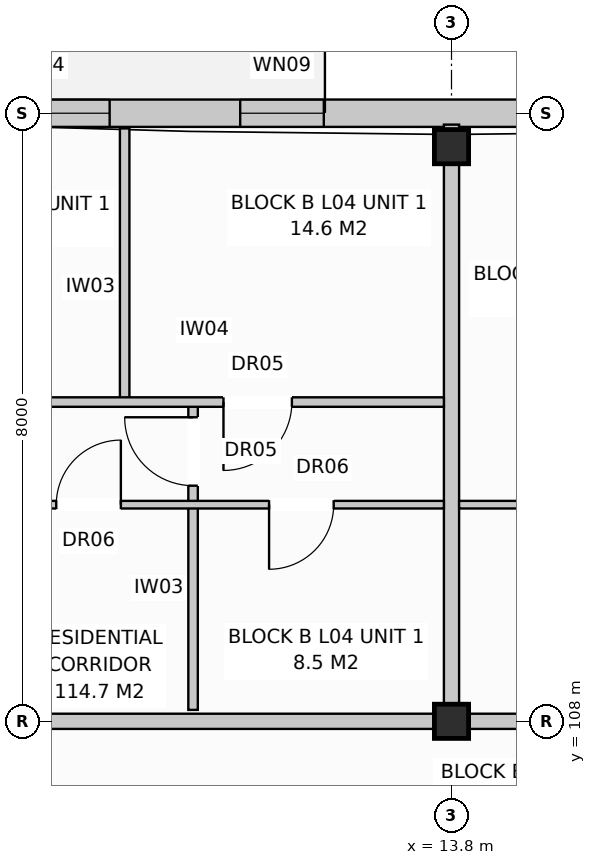
"""IFC4 building model, lengths in metres.
Left out: names, types, materials, properties, quantities, classifications, styles, units other than length and angle.
Written with IfcOpenShell. Run it as: python <this file> out.ifc"""

import sys

from ifc_helpers import new_model, si_unit, direction, frame, frame_2d, origin, origin_with_axes, origin_2d, place, context, subcontext, project, spatial, rectangle, extrude, element, fill, save


model = new_model("IFC4")
c1 = context("Model", 3, precision=1e-05, world=origin(), true_north=direction((0.0, 1.0)))
c2 = subcontext(c1, "Body", "Model", "MODEL_VIEW")
j1 = project(units=[si_unit("LENGTHUNIT", "METRE"), si_unit("PLANEANGLEUNIT", "RADIAN")], contexts=[c1])
p1 = place(None, origin())
s1 = spatial("IfcSite", under=j1, at=p1, CompositionType="ELEMENT")
p2 = place(p1, origin())
s2 = spatial("IfcBuilding", under=s1, at=p2, CompositionType="ELEMENT")
p3 = place(p2, frame((0.0, 0.0, 14.4)))
s3 = spatial("IfcBuildingStorey", under=s2, at=p3, CompositionType="ELEMENT", Elevation=14.4)
for number, where, z_axis, x_axis in (
    (1, (13.8, 108.0, 0.0), (0.0, 0.0, 1.0), (1.0, 0.0, 0.0)),
    (2, (13.8, 115.56, 0.0), (0.0, 0.0, 1.0), (1.0, 0.0, 0.0)),
):
    element("IfcColumn", number, at=place(p3, frame(where, z_axis=z_axis, x_axis=x_axis)), inside=s3, PredefinedType="COLUMN", context=c2, shape_type="SweptSolid", body=[
        extrude(rectangle(XDim=0.45, YDim=0.45, at=origin_2d()), origin(), (0.0, 0.0, 1.0), 3.2),
    ])
p4 = place(p3, frame((0.17, 116.0, 0.0), z_axis=(0.0, 0.0, 1.0), x_axis=(1.0, 0.0, 0.0)))
e3 = element("IfcWall", 3, at=p4, inside=s3, PredefinedType="STANDARD", context=c2, shape_type="SweptSolid", body=[
    extrude(rectangle(XDim=54.86, YDim=0.36, at=frame_2d((27.43, 0.0))), origin(), (0.0, 0.0, 1.0), 2.94),
])
p5 = place(p4, frame((3.815, 0.0, 0.0)))
e4 = element("IfcOpeningElement", 4, at=p5, cuts=e3, PredefinedType="OPENING", context=c2, shape_type="SweptSolid", body=[
    extrude(rectangle(XDim=0.95, YDim=2.1, at=frame_2d((0.475, 1.05))), frame((0.0, 0.192, 0.0), z_axis=(0.0, -1.0, 0.0), x_axis=(1.0, 0.0, 0.0)), (0.0, 0.0, 1.0), 0.384),
])
p6 = place(p4, frame((16.615, 0.0, 0.0)))
e5 = element("IfcOpeningElement", 5, at=p6, cuts=e3, PredefinedType="OPENING", context=c2, shape_type="SweptSolid", body=[
    extrude(rectangle(XDim=0.95, YDim=2.1, at=frame_2d((0.475, 1.05))), frame((0.0, 0.192, 0.0), z_axis=(0.0, -1.0, 0.0), x_axis=(1.0, 0.0, 0.0)), (0.0, 0.0, 1.0), 0.384),
])
p7 = place(p4, frame((30.115, 0.0, 0.0)))
e6 = element("IfcOpeningElement", 6, at=p7, cuts=e3, PredefinedType="OPENING", context=c2, shape_type="SweptSolid", body=[
    extrude(rectangle(XDim=0.95, YDim=2.1, at=frame_2d((0.475, 1.05))), frame((0.0, 0.192, 0.0), z_axis=(0.0, -1.0, 0.0), x_axis=(1.0, 0.0, 0.0)), (0.0, 0.0, 1.0), 0.384),
])
p8 = place(p4, frame((45.228, 0.0, 0.0)))
e7 = element("IfcOpeningElement", 7, at=p8, cuts=e3, PredefinedType="OPENING", context=c2, shape_type="SweptSolid", body=[
    extrude(rectangle(XDim=0.95, YDim=2.1, at=frame_2d((0.475, 1.05))), frame((0.0, 0.192, 0.0), z_axis=(0.0, -1.0, 0.0), x_axis=(1.0, 0.0, 0.0)), (0.0, 0.0, 1.0), 0.384),
])
p9 = place(p4, frame((1.55, 0.0, 0.8)))
e8 = element("IfcOpeningElement", 8, at=p9, cuts=e3, PredefinedType="OPENING", context=c2, shape_type="SweptSolid", body=[
    extrude(rectangle(XDim=1.9, YDim=1.85, at=frame_2d((0.95, 0.925))), frame((0.0, 0.192, 0.0), z_axis=(0.0, -1.0, 0.0), x_axis=(1.0, 0.0, 0.0)), (0.0, 0.0, 1.0), 0.384),
])
p10 = place(p4, frame((7.183, 0.0, 0.8)))
e9 = element("IfcOpeningElement", 9, at=p10, cuts=e3, PredefinedType="OPENING", context=c2, shape_type="SweptSolid", body=[
    extrude(rectangle(XDim=1.95, YDim=1.65, at=frame_2d((0.975, 0.825))), frame((0.0, 0.192, 0.0), z_axis=(0.0, -1.0, 0.0), x_axis=(1.0, 0.0, 0.0)), (0.0, 0.0, 1.0), 0.384),
])
p11 = place(p4, frame((10.85, 0.0, 0.72)))
e10 = element("IfcOpeningElement", 10, at=p11, cuts=e3, PredefinedType="OPENING", context=c2, shape_type="SweptSolid", body=[
    extrude(rectangle(XDim=1.1, YDim=1.5, at=frame_2d((0.55, 0.75))), frame((0.0, 0.192, 0.0), z_axis=(0.0, -1.0, 0.0), x_axis=(1.0, 0.0, 0.0)), (0.0, 0.0, 1.0), 0.384),
])
p12 = place(p4, frame((14.85, 0.0, 0.72)))
e11 = element("IfcOpeningElement", 11, at=p12, cuts=e3, PredefinedType="OPENING", context=c2, shape_type="SweptSolid", body=[
    extrude(rectangle(XDim=1.1, YDim=1.5, at=frame_2d((0.55, 0.75))), frame((0.0, 0.192, 0.0), z_axis=(0.0, -1.0, 0.0), x_axis=(1.0, 0.0, 0.0)), (0.0, 0.0, 1.0), 0.384),
])
p13 = place(p4, frame((18.125, 0.0, 0.8)))
e12 = element("IfcOpeningElement", 12, at=p13, cuts=e3, PredefinedType="OPENING", context=c2, shape_type="SweptSolid", body=[
    extrude(rectangle(XDim=1.95, YDim=1.65, at=frame_2d((0.975, 0.825))), frame((0.0, 0.192, 0.0), z_axis=(0.0, -1.0, 0.0), x_axis=(1.0, 0.0, 0.0)), (0.0, 0.0, 1.0), 0.384),
])
p14 = place(p4, frame((23.9, 0.0, 0.8)))
e13 = element("IfcOpeningElement", 13, at=p14, cuts=e3, PredefinedType="OPENING", context=c2, shape_type="SweptSolid", body=[
    extrude(rectangle(XDim=1.8, YDim=1.7, at=frame_2d((0.9, 0.85))), frame((0.0, 0.192, 0.0), z_axis=(0.0, -1.0, 0.0), x_axis=(1.0, 0.0, 0.0)), (0.0, 0.0, 1.0), 0.384),
])
p15 = place(p4, frame((28.35, 0.0, 0.72)))
e14 = element("IfcOpeningElement", 14, at=p15, cuts=e3, PredefinedType="OPENING", context=c2, shape_type="SweptSolid", body=[
    extrude(rectangle(XDim=1.1, YDim=1.5, at=frame_2d((0.55, 0.75))), frame((0.0, 0.192, 0.0), z_axis=(0.0, -1.0, 0.0), x_axis=(1.0, 0.0, 0.0)), (0.0, 0.0, 1.0), 0.384),
])
p16 = place(p4, frame((31.825, 0.0, 0.8)))
e15 = element("IfcOpeningElement", 15, at=p16, cuts=e3, PredefinedType="OPENING", context=c2, shape_type="SweptSolid", body=[
    extrude(rectangle(XDim=1.95, YDim=1.65, at=frame_2d((0.975, 0.825))), frame((0.0, 0.192, 0.0), z_axis=(0.0, -1.0, 0.0), x_axis=(1.0, 0.0, 0.0)), (0.0, 0.0, 1.0), 0.384),
])
p17 = place(p4, frame((35.4, 0.0, 0.8)))
e16 = element("IfcOpeningElement", 16, at=p17, cuts=e3, PredefinedType="OPENING", context=c2, shape_type="SweptSolid", body=[
    extrude(rectangle(XDim=1.8, YDim=1.7, at=frame_2d((0.9, 0.85))), frame((0.0, 0.192, 0.0), z_axis=(0.0, -1.0, 0.0), x_axis=(1.0, 0.0, 0.0)), (0.0, 0.0, 1.0), 0.384),
])
p18 = place(p4, frame((39.15, 0.0, 0.72)))
e17 = element("IfcOpeningElement", 17, at=p18, cuts=e3, PredefinedType="OPENING", context=c2, shape_type="SweptSolid", body=[
    extrude(rectangle(XDim=1.1, YDim=1.5, at=frame_2d((0.55, 0.75))), frame((0.0, 0.192, 0.0), z_axis=(0.0, -1.0, 0.0), x_axis=(1.0, 0.0, 0.0)), (0.0, 0.0, 1.0), 0.384),
])
p19 = place(p4, frame((43.35, 0.0, 0.72)))
e18 = element("IfcOpeningElement", 18, at=p19, cuts=e3, PredefinedType="OPENING", context=c2, shape_type="SweptSolid", body=[
    extrude(rectangle(XDim=1.1, YDim=1.5, at=frame_2d((0.55, 0.75))), frame((0.0, 0.192, 0.0), z_axis=(0.0, -1.0, 0.0), x_axis=(1.0, 0.0, 0.0)), (0.0, 0.0, 1.0), 0.384),
])
p20 = place(p4, frame((48.7, 0.0, 0.8)))
e19 = element("IfcOpeningElement", 19, at=p20, cuts=e3, PredefinedType="OPENING", context=c2, shape_type="SweptSolid", body=[
    extrude(rectangle(XDim=1.8, YDim=1.7, at=frame_2d((0.9, 0.85))), frame((0.0, 0.192, 0.0), z_axis=(0.0, -1.0, 0.0), x_axis=(1.0, 0.0, 0.0)), (0.0, 0.0, 1.0), 0.384),
])
p21 = place(p4, frame((52.25, 0.0, 0.72)))
e20 = element("IfcOpeningElement", 20, at=p21, cuts=e3, PredefinedType="OPENING", context=c2, shape_type="SweptSolid", body=[
    extrude(rectangle(XDim=1.1, YDim=1.5, at=frame_2d((0.55, 0.75))), frame((0.0, 0.192, 0.0), z_axis=(0.0, -1.0, 0.0), x_axis=(1.0, 0.0, 0.0)), (0.0, 0.0, 1.0), 0.384),
])
p22 = place(p3, frame((13.8, 108.15, 0.0), z_axis=(0.0, 0.0, 1.0), x_axis=(0.0, 1.0, 0.0)))
e21 = element("IfcWall", 21, at=p22, inside=s3, PredefinedType="PARTITIONING", context=c2, shape_type="SweptSolid", body=[
    extrude(rectangle(XDim=7.7, YDim=0.2, at=frame_2d((3.85, 0.0))), origin(), (0.0, 0.0, 1.0), 2.94),
])
p23 = place(p3, frame((0.0, 108.0, 0.0), z_axis=(0.0, 0.0, 1.0), x_axis=(1.0, 0.0, 0.0)))
e22 = element("IfcWall", 22, at=p23, inside=s3, PredefinedType="PARTITIONING", context=c2, shape_type="SweptSolid", body=[
    extrude(rectangle(XDim=13.8, YDim=0.2, at=frame_2d((6.9, 0.0))), origin(), (0.0, 0.0, 1.0), 2.38),
])
p24 = place(p23, frame((2.4, 0.0, 0.0)))
e23 = element("IfcOpeningElement", 23, at=p24, cuts=e22, PredefinedType="OPENING", context=c2, shape_type="SweptSolid", body=[
    extrude(rectangle(XDim=0.95, YDim=2.15, at=frame_2d((0.475, 1.075))), frame((0.0, 0.112, 0.0), z_axis=(0.0, -1.0, 0.0), x_axis=(1.0, 0.0, 0.0)), (0.0, 0.0, 1.0), 0.224),
])
p25 = place(p3, frame((10.4, 108.15, 0.0), z_axis=(0.0, 0.0, 1.0), x_axis=(0.0, 1.0, 0.0)))
e24 = element("IfcWall", 24, at=p25, inside=s3, PredefinedType="PARTITIONING", context=c2, shape_type="SweptSolid", body=[
    extrude(rectangle(XDim=4.05, YDim=0.125, at=frame_2d((2.025, 0.0))), origin(), (0.0, 0.0, 1.0), 2.94),
])
p26 = place(p25, frame((2.95, 0.0, 0.0)))
e25 = element("IfcOpeningElement", 25, at=p26, cuts=e24, PredefinedType="OPENING", context=c2, shape_type="SweptSolid", body=[
    extrude(rectangle(XDim=0.9, YDim=2.1, at=frame_2d((0.45, 1.05))), frame((0.0, 0.074, 0.0), z_axis=(0.0, -1.0, 0.0), x_axis=(1.0, 0.0, 0.0)), (0.0, 0.0, 1.0), 0.149),
])
p27 = place(p3, frame((9.5, 112.2, 0.0), z_axis=(0.0, 0.0, 1.0), x_axis=(0.0, 1.0, 0.0)))
e26 = element("IfcWall", 26, at=p27, inside=s3, PredefinedType="PARTITIONING", context=c2, shape_type="SweptSolid", body=[
    extrude(rectangle(XDim=3.6, YDim=0.125, at=frame_2d((1.8, 0.0))), origin(), (0.0, 0.0, 1.0), 2.94),
])
p28 = place(p3, frame((5.2, 110.85, 0.0), z_axis=(0.0, 0.0, 1.0), x_axis=(1.0, 0.0, 0.0)))
e27 = element("IfcWall", 27, at=p28, inside=s3, PredefinedType="PARTITIONING", context=c2, shape_type="SweptSolid", body=[
    extrude(rectangle(XDim=8.5, YDim=0.1, at=frame_2d((4.25, 0.0))), origin(), (0.0, 0.0, 1.0), 2.94),
])
p29 = place(p28, frame((1.0, 0.0, 0.0)))
e28 = element("IfcOpeningElement", 28, at=p29, cuts=e27, PredefinedType="OPENING", context=c2, shape_type="SweptSolid", body=[
    extrude(rectangle(XDim=0.85, YDim=2.1, at=frame_2d((0.425, 1.05))), frame((0.0, 0.062, 0.0), z_axis=(0.0, -1.0, 0.0), x_axis=(1.0, 0.0, 0.0)), (0.0, 0.0, 1.0), 0.124),
])
p30 = place(p28, frame((3.4, 0.0, 0.0)))
e29 = element("IfcOpeningElement", 29, at=p30, cuts=e27, PredefinedType="OPENING", context=c2, shape_type="SweptSolid", body=[
    extrude(rectangle(XDim=0.85, YDim=2.05, at=frame_2d((0.425, 1.025))), frame((0.0, 0.062, 0.0), z_axis=(0.0, -1.0, 0.0), x_axis=(1.0, 0.0, 0.0)), (0.0, 0.0, 1.0), 0.124),
])
p31 = place(p28, frame((6.2, 0.0, 0.0)))
e30 = element("IfcOpeningElement", 30, at=p31, cuts=e27, PredefinedType="OPENING", context=c2, shape_type="SweptSolid", body=[
    extrude(rectangle(XDim=0.85, YDim=2.05, at=frame_2d((0.425, 1.025))), frame((0.0, 0.062, 0.0), z_axis=(0.0, -1.0, 0.0), x_axis=(1.0, 0.0, 0.0)), (0.0, 0.0, 1.0), 0.124),
])
p32 = place(p3, frame((5.2, 112.2, 0.0), z_axis=(0.0, 0.0, 1.0), x_axis=(1.0, 0.0, 0.0)))
e31 = element("IfcWall", 31, at=p32, inside=s3, PredefinedType="PARTITIONING", context=c2, shape_type="SweptSolid", body=[
    extrude(rectangle(XDim=8.5, YDim=0.125, at=frame_2d((4.25, 0.0))), origin(), (0.0, 0.0, 1.0), 2.94),
])
p33 = place(p32, frame((1.5, 0.0, 0.0)))
e32 = element("IfcOpeningElement", 32, at=p33, cuts=e31, PredefinedType="OPENING", context=c2, shape_type="SweptSolid", body=[
    extrude(rectangle(XDim=0.9, YDim=2.1, at=frame_2d((0.45, 1.05))), frame((0.0, 0.074, 0.0), z_axis=(0.0, -1.0, 0.0), x_axis=(1.0, 0.0, 0.0)), (0.0, 0.0, 1.0), 0.149),
])
p34 = place(p32, frame((5.6, 0.0, 0.0)))
e33 = element("IfcOpeningElement", 33, at=p34, cuts=e31, PredefinedType="OPENING", context=c2, shape_type="SweptSolid", body=[
    extrude(rectangle(XDim=0.9, YDim=2.1, at=frame_2d((0.45, 1.05))), frame((0.0, 0.074, 0.0), z_axis=(0.0, -1.0, 0.0), x_axis=(1.0, 0.0, 0.0)), (0.0, 0.0, 1.0), 0.149),
])
p35 = place(p3, frame((13.8, 108.0, 0.0), z_axis=(0.0, 0.0, 1.0), x_axis=(1.0, 0.0, 0.0)))
e34 = element("IfcWall", 34, at=p35, inside=s3, PredefinedType="PARTITIONING", context=c2, shape_type="SweptSolid", body=[
    extrude(rectangle(XDim=13.8, YDim=0.2, at=frame_2d((6.9, 0.0))), origin(), (0.0, 0.0, 1.0), 2.38),
])
p36 = place(p35, frame((9.6, 0.0, 0.0)))
e35 = element("IfcOpeningElement", 35, at=p36, cuts=e34, PredefinedType="OPENING", context=c2, shape_type="SweptSolid", body=[
    extrude(rectangle(XDim=0.95, YDim=2.15, at=frame_2d((0.475, 1.075))), frame((0.0, 0.112, 0.0), z_axis=(0.0, -1.0, 0.0), x_axis=(1.0, 0.0, 0.0)), (0.0, 0.0, 1.0), 0.224),
])
p37 = place(p3, frame((13.9, 110.85, 0.0), z_axis=(0.0, 0.0, 1.0), x_axis=(1.0, 0.0, 0.0)))
e36 = element("IfcWall", 36, at=p37, inside=s3, PredefinedType="PARTITIONING", context=c2, shape_type="SweptSolid", body=[
    extrude(rectangle(XDim=8.6, YDim=0.1, at=frame_2d((4.3, 0.0))), origin(), (0.0, 0.0, 1.0), 2.94),
])
p38 = place(p37, frame((1.4, 0.0, 0.0)))
e37 = element("IfcOpeningElement", 37, at=p38, cuts=e36, PredefinedType="OPENING", context=c2, shape_type="SweptSolid", body=[
    extrude(rectangle(XDim=0.85, YDim=2.05, at=frame_2d((0.425, 1.025))), frame((0.0, 0.062, 0.0), z_axis=(0.0, -1.0, 0.0), x_axis=(1.0, 0.0, 0.0)), (0.0, 0.0, 1.0), 0.124),
])
p39 = place(p37, frame((4.65, 0.0, 0.0)))
e38 = element("IfcOpeningElement", 38, at=p39, cuts=e36, PredefinedType="OPENING", context=c2, shape_type="SweptSolid", body=[
    extrude(rectangle(XDim=0.85, YDim=2.05, at=frame_2d((0.425, 1.025))), frame((0.0, 0.062, 0.0), z_axis=(0.0, -1.0, 0.0), x_axis=(1.0, 0.0, 0.0)), (0.0, 0.0, 1.0), 0.124),
])
p40 = place(p37, frame((6.8, 0.0, 0.0)))
e39 = element("IfcOpeningElement", 39, at=p40, cuts=e36, PredefinedType="OPENING", context=c2, shape_type="SweptSolid", body=[
    extrude(rectangle(XDim=0.85, YDim=2.1, at=frame_2d((0.425, 1.05))), frame((0.0, 0.062, 0.0), z_axis=(0.0, -1.0, 0.0), x_axis=(1.0, 0.0, 0.0)), (0.0, 0.0, 1.0), 0.124),
])
p41 = place(p10, origin_with_axes())
e40 = element("IfcWindow", 40, at=p41, inside=s3, PartitioningType="SINGLE_PANEL", PredefinedType="WINDOW", context=c2, shape_type="SweptSolid", body=[
    extrude(rectangle(XDim=1.95, YDim=1.65, at=frame_2d((0.975, 0.825))), frame((0.0, 0.03, 0.0), z_axis=(0.0, -1.0, 0.0), x_axis=(1.0, 0.0, 0.0)), (0.0, 0.0, 1.0), 0.06),
])
fill(e9, e40)
p42 = place(p11, origin_with_axes())
e41 = element("IfcWindow", 41, at=p42, inside=s3, PartitioningType="SINGLE_PANEL", PredefinedType="WINDOW", context=c2, shape_type="SweptSolid", body=[
    extrude(rectangle(XDim=1.1, YDim=1.5, at=frame_2d((0.55, 0.75))), frame((0.0, 0.03, 0.0), z_axis=(0.0, -1.0, 0.0), x_axis=(1.0, 0.0, 0.0)), (0.0, 0.0, 1.0), 0.06),
])
fill(e10, e41)
p43 = place(p26, origin_with_axes())
e42 = element("IfcDoor", 42, at=p43, inside=s3, OperationType="SINGLE_SWING_RIGHT", PredefinedType="DOOR", context=c2, shape_type="SweptSolid", body=[
    extrude(rectangle(XDim=0.9, YDim=2.1, at=frame_2d((0.45, 1.05))), frame((0.0, 0.025, 0.0), z_axis=(0.0, -1.0, 0.0), x_axis=(1.0, 0.0, 0.0)), (0.0, 0.0, 1.0), 0.05),
])
fill(e25, e42)
p44 = place(p30, origin_with_axes())
e43 = element("IfcDoor", 43, at=p44, inside=s3, OperationType="SINGLE_SWING_RIGHT", PredefinedType="DOOR", context=c2, shape_type="SweptSolid", body=[
    extrude(rectangle(XDim=0.85, YDim=2.05, at=frame_2d((0.425, 1.025))), frame((0.0, 0.025, 0.0), z_axis=(0.0, -1.0, 0.0), x_axis=(1.0, 0.0, 0.0)), (0.0, 0.0, 1.0), 0.05),
])
fill(e29, e43)
p45 = place(p31, frame((0.85, 0.0, 0.0), z_axis=(0.0, 0.0, 1.0), x_axis=(-1.0, 0.0, 0.0)))
e44 = element("IfcDoor", 44, at=p45, inside=s3, OperationType="SINGLE_SWING_LEFT", PredefinedType="DOOR", context=c2, shape_type="SweptSolid", body=[
    extrude(rectangle(XDim=0.85, YDim=2.05, at=frame_2d((0.425, 1.025))), frame((0.0, 0.025, 0.0), z_axis=(0.0, -1.0, 0.0), x_axis=(1.0, 0.0, 0.0)), (0.0, 0.0, 1.0), 0.05),
])
fill(e30, e44)
p46 = place(p34, frame((0.9, 0.0, 0.0), z_axis=(0.0, 0.0, 1.0), x_axis=(-1.0, 0.0, 0.0)))
e45 = element("IfcDoor", 45, at=p46, inside=s3, OperationType="SINGLE_SWING_LEFT", PredefinedType="DOOR", context=c2, shape_type="SweptSolid", body=[
    extrude(rectangle(XDim=0.9, YDim=2.1, at=frame_2d((0.45, 1.05))), frame((0.0, 0.025, 0.0), z_axis=(0.0, -1.0, 0.0), x_axis=(1.0, 0.0, 0.0)), (0.0, 0.0, 1.0), 0.05),
])
fill(e33, e45)
save(model, sys.argv[1])
